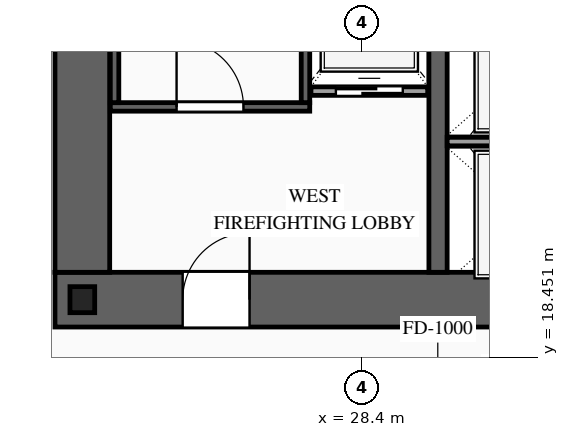
"""IFC4 building model, lengths in metres.
Left out: names, types, materials, properties, quantities, classifications, styles, units other than length and angle.
Written with IfcOpenShell. Run it as: python <this file> out.ifc"""

import sys

from ifc_helpers import new_model, si_unit, direction, frame, frame_2d, origin, origin_2d, place, context, subcontext, project, spatial, rectangle, i_section, extrude, source, transform, mapped, element, fill, save


model = new_model("IFC4")
c1 = context("Model", 3, precision=1e-05, world=origin(), true_north=direction((0.0, 1.0)))
c2 = subcontext(c1, "Body", "Model", "MODEL_VIEW")
j1 = project(units=[si_unit("LENGTHUNIT", "METRE"), si_unit("PLANEANGLEUNIT", "RADIAN")], contexts=[c1])
p1 = place(None, origin())
s1 = spatial("IfcSite", under=j1, at=p1, CompositionType="ELEMENT")
p2 = place(p1, origin())
s2 = spatial("IfcBuilding", under=s1, at=p2, CompositionType="ELEMENT")
p3 = place(p2, frame((0.0, 0.0, 53.2)))
s3 = spatial("IfcBuildingStorey", under=s2, at=p3, CompositionType="ELEMENT", Elevation=53.2)
p4 = place(p3, frame((23.35, 19.4, 0.0), z_axis=(0.0, 0.0, 1.0), x_axis=(1.0, 0.0, 0.0)))
e1 = element("IfcWall", 1, at=p4, inside=s3, PredefinedType="SHEAR", context=c2, shape_type="SweptSolid", body=[
    extrude(rectangle(XDim=27.3, YDim=0.9, at=frame_2d((13.65, 0.0))), origin(), (0.0, 0.0, 1.0), 3.6),
])
p5 = place(p4, frame((2.1, 0.0, 0.0)))
e2 = element("IfcOpeningElement", 2, at=p5, cuts=e1, PredefinedType="OPENING", context=c2, shape_type="SweptSolid", body=[
    extrude(rectangle(XDim=1.1, YDim=2.2, at=frame_2d((0.55, 1.1))), frame((0.0, 0.465, 0.0), z_axis=(0.0, -1.0, 0.0), x_axis=(1.0, 0.0, 0.0)), (0.0, 0.0, 1.0), 0.93),
])
p6 = place(p4, frame((10.0, 0.0, 0.0)))
e3 = element("IfcOpeningElement", 3, at=p6, cuts=e1, PredefinedType="OPENING", context=c2, shape_type="SweptSolid", body=[
    extrude(rectangle(XDim=1.1, YDim=2.2, at=frame_2d((0.55, 1.1))), frame((0.0, 0.465, 0.0), z_axis=(0.0, -1.0, 0.0), x_axis=(1.0, 0.0, 0.0)), (0.0, 0.0, 1.0), 0.93),
])
p7 = place(p4, frame((23.2, 0.0, 0.0)))
e4 = element("IfcOpeningElement", 4, at=p7, cuts=e1, PredefinedType="OPENING", context=c2, shape_type="SweptSolid", body=[
    extrude(rectangle(XDim=1.1, YDim=2.2, at=frame_2d((0.55, 1.1))), frame((0.0, 0.465, 0.0), z_axis=(0.0, -1.0, 0.0), x_axis=(1.0, 0.0, 0.0)), (0.0, 0.0, 1.0), 0.93),
])
p8 = place(p4, frame((19.82, 0.0, 0.0)))
e5 = element("IfcOpeningElement", 5, at=p8, cuts=e1, PredefinedType="OPENING", context=c2, shape_type="SweptSolid", body=[
    extrude(rectangle(XDim=0.9, YDim=2.15, at=frame_2d((0.45, 1.075))), frame((0.0, 0.465, 0.0), z_axis=(0.0, -1.0, 0.0), x_axis=(1.0, 0.0, 0.0)), (0.0, 0.0, 1.0), 0.93),
])
p9 = place(p4, frame((18.38, 0.0, 0.0)))
e6 = element("IfcOpeningElement", 6, at=p9, cuts=e1, PredefinedType="OPENING", context=c2, shape_type="SweptSolid", body=[
    extrude(rectangle(XDim=0.9, YDim=2.15, at=frame_2d((0.45, 1.075))), frame((0.0, 0.465, 0.0), z_axis=(0.0, -1.0, 0.0), x_axis=(1.0, 0.0, 0.0)), (0.0, 0.0, 1.0), 0.93),
])
m1 = source(origin(), c2, "Body", "SweptSolid", [
    extrude(rectangle(XDim=11.9, YDim=0.9, at=frame_2d((5.95, 0.0))), origin(), (0.0, 0.0, 1.0), 3.6),
])
p10 = place(p3, frame((23.8, 19.85, 0.0), z_axis=(0.0, 0.0, 1.0), x_axis=(0.0, 1.0, 0.0)))
e7 = element("IfcWall", 7, at=p10, inside=s3, PredefinedType="SHEAR", context=c2, shape_type="MappedRepresentation", body=[
    mapped(m1, transform((0.0, 0.0, 0.0), scale=1.0)),
])
m2 = source(origin(), c2, "Body", "SweptSolid", [
    extrude(rectangle(XDim=11.9, YDim=0.3, at=frame_2d((5.95, 0.0))), origin(), (0.0, 0.0, 1.0), 3.6),
])
p11 = place(p3, frame((29.65, 19.85, 0.0), z_axis=(0.0, 0.0, 1.0), x_axis=(0.0, 1.0, 0.0)))
e8 = element("IfcWall", 8, at=p11, inside=s3, PredefinedType="SOLIDWALL", context=c2, shape_type="MappedRepresentation", body=[
    mapped(m2, transform((0.0, 0.0, 0.0), scale=1.0)),
])
m3 = source(origin(), c2, "Body", "SweptSolid", [
    extrude(i_section(OverallWidth=0.407, OverallDepth=0.428, WebThickness=0.02, FlangeThickness=0.035, at=origin_2d()), origin(), (0.0, 0.0, 1.0), 3.6),
])
p12 = place(p3, frame((23.8, 19.4, 0.0), z_axis=(0.0, 0.0, 1.0), x_axis=(1.0, 0.0, 0.0)))
e9 = element("IfcColumn", 9, at=p12, inside=s3, PredefinedType="COLUMN", context=c2, shape_type="MappedRepresentation", body=[
    mapped(m3, transform((0.0, 0.0, 0.0), scale=1.0)),
])
p13 = place(p3, frame((27.56, 22.83, 0.0), z_axis=(0.0, 0.0, 1.0), x_axis=(1.0, 0.0, 0.0)))
e10 = element("IfcWall", 10, at=p13, inside=s3, PredefinedType="SOLIDWALL", context=c2, shape_type="SweptSolid", body=[
    extrude(rectangle(XDim=1.92, YDim=0.14, at=frame_2d((0.96, 0.0))), origin(), (0.0, 0.0, 1.0), 3.38),
])
p14 = place(p13, frame((0.41, 0.0, 0.0)))
e11 = element("IfcOpeningElement", 11, at=p14, cuts=e10, PredefinedType="OPENING", context=c2, shape_type="SweptSolid", body=[
    extrude(rectangle(XDim=1.1, YDim=2.2, at=frame_2d((0.55, 1.1))), frame((0.0, 0.085, 0.0), z_axis=(0.0, -1.0, 0.0), x_axis=(1.0, 0.0, 0.0)), (0.0, 0.0, 1.0), 0.17),
])
m4 = source(origin(), c2, "Body", "SweptSolid", [
    extrude(rectangle(XDim=2.5, YDim=0.14, at=frame_2d((1.25, 0.0))), origin(), (0.0, 0.0, 1.0), 3.38),
])
p15 = place(p3, frame((29.8, 22.0, 0.0), z_axis=(0.0, 0.0, 1.0), x_axis=(1.0, 0.0, 0.0)))
e12 = element("IfcWall", 12, at=p15, inside=s3, PredefinedType="SOLIDWALL", context=c2, shape_type="MappedRepresentation", body=[
    mapped(m4, transform((0.0, 0.0, 0.0), scale=1.0)),
])
p16 = place(p3, frame((24.26, 22.57, 0.0), z_axis=(0.0, 0.0, 1.0), x_axis=(1.0, 0.0, 0.0)))
e13 = element("IfcWall", 13, at=p16, inside=s3, PredefinedType="SOLIDWALL", context=c2, shape_type="SweptSolid", body=[
    extrude(rectangle(XDim=3.28, YDim=0.14, at=frame_2d((1.64, 0.0))), origin(), (0.0, 0.0, 1.0), 3.38),
])
p17 = place(p16, frame((1.09, 0.0, 0.0)))
e14 = element("IfcOpeningElement", 14, at=p17, cuts=e13, PredefinedType="OPENING", context=c2, shape_type="SweptSolid", body=[
    extrude(rectangle(XDim=1.1, YDim=2.2, at=frame_2d((0.55, 1.1))), frame((0.0, 0.085, 0.0), z_axis=(0.0, -1.0, 0.0), x_axis=(1.0, 0.0, 0.0)), (0.0, 0.0, 1.0), 0.17),
])
m5 = source(origin(), c2, "Body", "SweptSolid", [
    extrude(rectangle(XDim=8.94, YDim=0.14, at=frame_2d((4.47, 0.0))), origin(), (0.0, 0.0, 1.0), 3.38),
])
for number, where, z_axis, x_axis in (
    (15, (24.33, 22.64, 0.0), (0.0, 0.0, 1.0), (0.0, 1.0, 0.0)),
    (16, (27.47, 22.64, 0.0), (0.0, 0.0, 1.0), (0.0, 1.0, 0.0)),
):
    element("IfcWall", number, at=place(p3, frame(where, z_axis=z_axis, x_axis=x_axis)), inside=s3, PredefinedType="SOLIDWALL", context=c2, shape_type="MappedRepresentation", body=[
        mapped(m5, transform((0.0, 0.0, 0.0), scale=1.0)),
    ])
m6 = source(origin(), c2, "Body", "SweptSolid", [
    extrude(rectangle(XDim=1.1, YDim=2.2, at=frame_2d((0.55, 1.1))), frame((0.0, 0.025, 0.0), z_axis=(0.0, -1.0, 0.0), x_axis=(1.0, 0.0, 0.0)), (0.0, 0.0, 1.0), 0.05),
])
p18 = place(p14, origin())
e17 = element("IfcDoor", 17, at=p18, inside=s3, OperationType="SLIDING_TO_LEFT", PredefinedType="DOOR", context=c2, shape_type="MappedRepresentation", body=[
    mapped(m6, transform((0.0, 0.0, 0.0), scale=1.0)),
])
fill(e11, e17)
m7 = source(origin(), c2, "Body", "SweptSolid", [
    extrude(rectangle(XDim=1.1, YDim=2.2, at=frame_2d((0.55, 1.1))), frame((0.0, 0.025, 0.0), z_axis=(0.0, -1.0, 0.0), x_axis=(1.0, 0.0, 0.0)), (0.0, 0.0, 1.0), 0.05),
])
p19 = place(p17, origin())
e18 = element("IfcDoor", 18, at=p19, inside=s3, OperationType="SINGLE_SWING_LEFT", PredefinedType="DOOR", context=c2, shape_type="MappedRepresentation", body=[
    mapped(m7, transform((0.0, 0.0, 0.0), scale=1.0)),
])
fill(e14, e18)
p20 = place(p5, origin())
e19 = element("IfcDoor", 19, at=p20, inside=s3, OperationType="SINGLE_SWING_RIGHT", PredefinedType="DOOR", context=c2, shape_type="MappedRepresentation", body=[
    mapped(m7, transform((0.0, 0.0, 0.0), scale=1.0)),
])
fill(e2, e19)
save(model, sys.argv[1])
